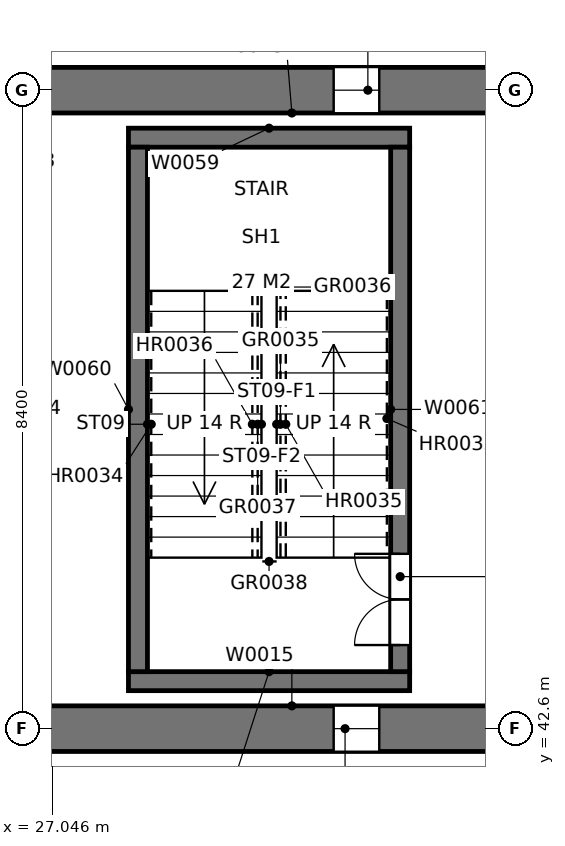
"""IFC4 building model, lengths in metres.
Left out: names, types, materials, properties, quantities, classifications, styles, units other than length and angle.
Written with IfcOpenShell. Run it as: python <this file> out.ifc"""

import sys

from ifc_helpers import new_model, si_unit, direction, frame, frame_2d, origin, place, context, subcontext, project, spatial, rectangle, extrude, element, fill, save


model = new_model("IFC4")
c1 = context("Model", 3, precision=1e-05, world=origin(), true_north=direction((0.0, 1.0)))
c2 = subcontext(c1, "Body", "Model", "MODEL_VIEW")
j1 = project(units=[si_unit("LENGTHUNIT", "METRE"), si_unit("PLANEANGLEUNIT", "RADIAN")], contexts=[c1])
p1 = place(None, origin())
s1 = spatial("IfcSite", under=j1, at=p1, CompositionType="ELEMENT")
p2 = place(p1, origin())
s2 = spatial("IfcBuilding", under=s1, at=p2, CompositionType="ELEMENT")
p3 = place(p2, frame((0.0, 0.0, 19.2)))
s3 = spatial("IfcBuildingStorey", under=s2, at=p3, CompositionType="ELEMENT", Elevation=19.2)
p4 = place(p3, frame((33.9, 51.0, 0.0), z_axis=(0.0, 0.0, 1.0), x_axis=(-1.0, 0.0, 0.0)))
e1 = element("IfcWall", 1, at=p4, inside=s3, PredefinedType="SOLIDWALL", context=c2, shape_type="SweptSolid", body=[
    extrude(rectangle(XDim=7.4, YDim=0.6, at=frame_2d((3.7, 0.0))), origin(), (0.0, 0.0, 1.0), 4.8),
])
p5 = place(p4, frame((2.55, 0.0, 1.5)))
e2 = element("IfcOpeningElement", 2, at=p5, cuts=e1, PredefinedType="OPENING", context=c2, shape_type="SweptSolid", body=[
    extrude(rectangle(XDim=0.6, YDim=1.8, at=frame_2d((0.3, 0.9))), frame((0.0, 0.31, 0.0), z_axis=(0.0, -1.0, 0.0), x_axis=(1.0, 0.0, 0.0)), (0.0, 0.0, 1.0), 0.62),
])
p6 = place(p3, frame((26.5, 42.6, 0.0), z_axis=(0.0, 0.0, 1.0), x_axis=(1.0, 0.0, 0.0)))
e3 = element("IfcWall", 3, at=p6, inside=s3, PredefinedType="SOLIDWALL", context=c2, shape_type="SweptSolid", body=[
    extrude(rectangle(XDim=7.4, YDim=0.6, at=frame_2d((3.7, 0.0))), origin(), (0.0, 0.0, 1.0), 4.8),
])
p7 = place(p6, frame((4.25, 0.0, 1.5)))
e4 = element("IfcOpeningElement", 4, at=p7, cuts=e3, PredefinedType="OPENING", context=c2, shape_type="SweptSolid", body=[
    extrude(rectangle(XDim=0.6, YDim=1.8, at=frame_2d((0.3, 0.9))), frame((0.0, 0.31, 0.0), z_axis=(0.0, -1.0, 0.0), x_axis=(1.0, 0.0, 0.0)), (0.0, 0.0, 1.0), 0.62),
])
for number, where, z_axis, x_axis in (
    (5, (28.05, 43.225, 0.0), (0.0, 0.0, 1.0), (1.0, 0.0, 0.0)),
    (6, (28.05, 50.375, 0.0), (0.0, 0.0, 1.0), (1.0, 0.0, 0.0)),
):
    element("IfcWall", number, at=place(p3, frame(where, z_axis=z_axis, x_axis=x_axis)), inside=s3, PredefinedType="SOLIDWALL", context=c2, shape_type="SweptSolid", body=[
        extrude(rectangle(XDim=3.7, YDim=0.25, at=frame_2d((1.85, 0.0))), origin(), (0.0, 0.0, 1.0), 4.8),
    ])
p8 = place(p3, frame((28.175, 43.35, 0.0), z_axis=(0.0, 0.0, 1.0), x_axis=(0.0, 1.0, 0.0)))
e7 = element("IfcWall", 7, at=p8, inside=s3, PredefinedType="SOLIDWALL", context=c2, shape_type="SweptSolid", body=[
    extrude(rectangle(XDim=6.9, YDim=0.25, at=frame_2d((3.45, 0.0))), origin(), (0.0, 0.0, 1.0), 4.8),
])
p9 = place(p3, frame((31.625, 43.35, 0.0), z_axis=(0.0, 0.0, 1.0), x_axis=(0.0, 1.0, 0.0)))
e8 = element("IfcWall", 8, at=p9, inside=s3, PredefinedType="SOLIDWALL", context=c2, shape_type="SweptSolid", body=[
    extrude(rectangle(XDim=6.9, YDim=0.25, at=frame_2d((3.45, 0.0))), origin(), (0.0, 0.0, 1.0), 4.8),
])
p10 = place(p9, frame((0.35, 0.0, 0.0)))
e9 = element("IfcOpeningElement", 9, at=p10, cuts=e8, PredefinedType="OPENING", context=c2, shape_type="SweptSolid", body=[
    extrude(rectangle(XDim=1.2, YDim=2.1, at=frame_2d((0.6, 1.05))), frame((0.0, 0.135, 0.0), z_axis=(0.0, -1.0, 0.0), x_axis=(1.0, 0.0, 0.0)), (0.0, 0.0, 1.0), 0.27),
])
p11 = place(p10, origin())
e10 = element("IfcDoor", 10, at=p11, inside=s3, OperationType="DOUBLE_DOOR_SINGLE_SWING", PredefinedType="DOOR", context=c2, shape_type="SweptSolid", body=[
    extrude(rectangle(XDim=1.2, YDim=2.1, at=frame_2d((0.6, 1.05))), frame((0.0, 0.025, 0.0), z_axis=(0.0, -1.0, 0.0), x_axis=(1.0, 0.0, 0.0)), (0.0, 0.0, 1.0), 0.05),
])
fill(e9, e10)
p12 = place(p5, origin())
e11 = element("IfcWindow", 11, at=p12, inside=s3, PartitioningType="SINGLE_PANEL", PredefinedType="WINDOW", context=c2, shape_type="SweptSolid", body=[
    extrude(rectangle(XDim=0.6, YDim=1.8, at=frame_2d((0.3, 0.9))), frame((0.0, 0.01, 0.0), z_axis=(0.0, -1.0, 0.0), x_axis=(1.0, 0.0, 0.0)), (0.0, 0.0, 1.0), 0.06),
])
fill(e2, e11)
p13 = place(p7, origin())
e12 = element("IfcWindow", 12, at=p13, inside=s3, PartitioningType="SINGLE_PANEL", PredefinedType="WINDOW", context=c2, shape_type="SweptSolid", body=[
    extrude(rectangle(XDim=0.6, YDim=1.8, at=frame_2d((0.3, 0.9))), frame((0.0, 0.01, 0.0), z_axis=(0.0, -1.0, 0.0), x_axis=(1.0, 0.0, 0.0)), (0.0, 0.0, 1.0), 0.06),
])
fill(e4, e12)
save(model, sys.argv[1])
